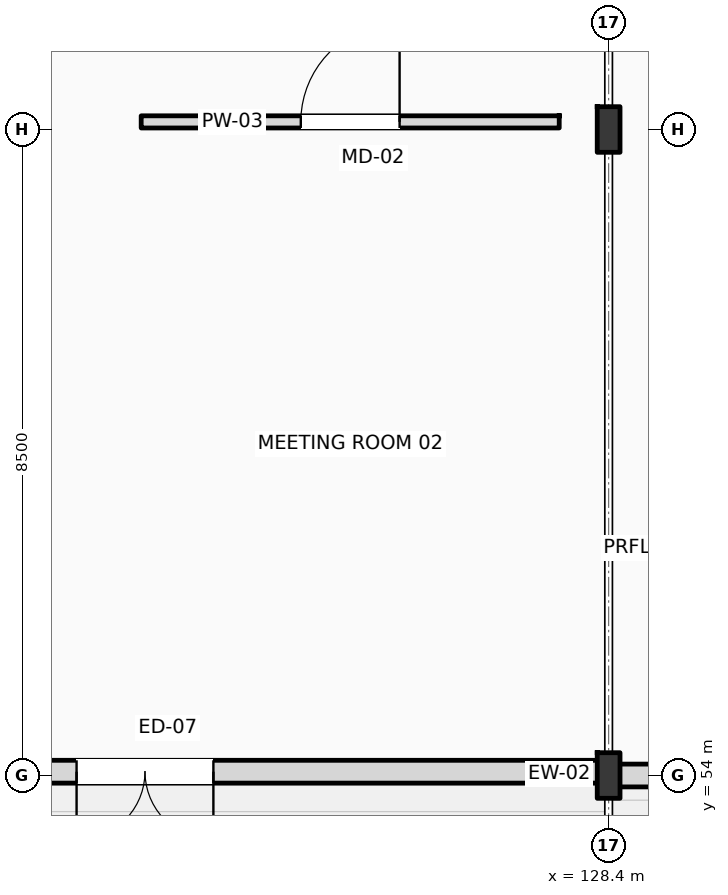
"""IFC4 building model, lengths in metres.
Left out: names, types, materials, properties, quantities, classifications, styles, units other than length and angle.
Written with IfcOpenShell. Run it as: python <this file> out.ifc"""

import sys

from ifc_helpers import new_model, si_unit, direction, frame, frame_2d, origin, origin_2d, place, context, subcontext, project, spatial, rectangle, i_section, extrude, element, fill, save


model = new_model("IFC4")
c1 = context("Model", 3, precision=1e-05, world=origin(), true_north=direction((0.0, 1.0)))
c2 = subcontext(c1, "Body", "Model", "MODEL_VIEW")
j1 = project(units=[si_unit("LENGTHUNIT", "METRE"), si_unit("PLANEANGLEUNIT", "RADIAN")], contexts=[c1])
p1 = place(None, origin())
s1 = spatial("IfcSite", under=j1, at=p1, CompositionType="ELEMENT")
p2 = place(p1, origin())
s2 = spatial("IfcBuilding", under=s1, at=p2, CompositionType="ELEMENT")
p3 = place(p2, origin())
s3 = spatial("IfcBuildingStorey", under=s2, at=p3, CompositionType="ELEMENT", Elevation=0.0)
for number, where, z_axis, x_axis in (
    (1, (128.4, 54.0, 0.0), (0.0, 0.0, 1.0), (1.0, 0.0, 0.0)),
    (2, (128.4, 62.5, 0.0), (0.0, 0.0, 1.0), (1.0, 0.0, 0.0)),
):
    element("IfcColumn", number, at=place(p3, frame(where, z_axis=z_axis, x_axis=x_axis)), inside=s3, PredefinedType="COLUMN", context=c2, shape_type="SweptSolid", body=[
        extrude(i_section(OverallWidth=0.3, OverallDepth=0.6, WebThickness=0.015, FlangeThickness=0.03, FilletRadius=0.027, at=origin_2d()), origin(), (0.0, 0.0, 1.0), 6.0),
    ])
p4 = place(p3, frame((128.4, 54.0, 0.0), z_axis=(0.0, 0.0, 1.0), x_axis=(1.0, 0.0, 0.0)))
e3 = element("IfcWall", 3, at=p4, inside=s3, PredefinedType="STANDARD", context=c2, shape_type="SweptSolid", body=[
    extrude(rectangle(XDim=9.0, YDim=0.3, at=frame_2d((4.5, 0.0))), origin(), (0.0, 0.0, 1.0), 5.09),
])
p5 = place(p4, frame((3.3, 0.0, 0.0)))
e4 = element("IfcOpeningElement", 4, at=p5, cuts=e3, PredefinedType="OPENING", context=c2, shape_type="SweptSolid", body=[
    extrude(rectangle(XDim=2.4, YDim=2.6, at=frame_2d((1.2, 1.3))), frame((0.0, 0.16, 0.0), z_axis=(0.0, -1.0, 0.0), x_axis=(1.0, 0.0, 0.0)), (0.0, 0.0, 1.0), 0.32),
])
p6 = place(p3, frame((103.2, 54.05, 0.0), z_axis=(0.0, 0.0, 1.0), x_axis=(1.0, 0.0, 0.0)))
e5 = element("IfcWall", 5, at=p6, inside=s3, PredefinedType="STANDARD", context=c2, shape_type="SweptSolid", body=[
    extrude(rectangle(XDim=25.15, YDim=0.3, at=frame_2d((12.575, 0.0))), origin(), (0.0, 0.0, 1.0), 5.14),
])
p7 = place(p6, frame((5.95, 0.0, 0.0)))
e6 = element("IfcOpeningElement", 6, at=p7, cuts=e5, PredefinedType="OPENING", context=c2, shape_type="SweptSolid", body=[
    extrude(rectangle(XDim=1.0, YDim=2.15, at=frame_2d((0.5, 1.075))), frame((0.0, 0.16, 0.0), z_axis=(0.0, -1.0, 0.0), x_axis=(1.0, 0.0, 0.0)), (0.0, 0.0, 1.0), 0.32),
])
p8 = place(p6, frame((18.2, 0.0, 0.0)))
e7 = element("IfcOpeningElement", 7, at=p8, cuts=e5, PredefinedType="OPENING", context=c2, shape_type="SweptSolid", body=[
    extrude(rectangle(XDim=1.8, YDim=2.4, at=frame_2d((0.9, 1.2))), frame((0.0, 0.16, 0.0), z_axis=(0.0, -1.0, 0.0), x_axis=(1.0, 0.0, 0.0)), (0.0, 0.0, 1.0), 0.32),
])
p9 = place(p3, frame((122.25, 62.6, 0.0), z_axis=(0.0, 0.0, 1.0), x_axis=(1.0, 0.0, 0.0)))
e8 = element("IfcWall", 8, at=p9, inside=s3, PredefinedType="PARTITIONING", context=c2, shape_type="SweptSolid", body=[
    extrude(rectangle(XDim=5.5, YDim=0.16, at=frame_2d((2.75, 0.0))), origin(), (0.0, 0.0, 1.0), 5.14),
])
p10 = place(p9, frame((2.1, 0.0, 0.0)))
e9 = element("IfcOpeningElement", 9, at=p10, cuts=e8, PredefinedType="OPENING", context=c2, shape_type="SweptSolid", body=[
    extrude(rectangle(XDim=1.3, YDim=2.2, at=frame_2d((0.65, 1.1))), frame((0.0, 0.09, 0.0), z_axis=(0.0, -1.0, 0.0), x_axis=(1.0, 0.0, 0.0)), (0.0, 0.0, 1.0), 0.18),
])
p11 = place(p8, frame((1.8, 0.0, 0.0), z_axis=(0.0, 0.0, 1.0), x_axis=(-1.0, 0.0, 0.0)))
e10 = element("IfcDoor", 10, at=p11, inside=s3, OperationType="DOUBLE_SWING_LEFT", PredefinedType="DOOR", context=c2, shape_type="SweptSolid", body=[
    extrude(rectangle(XDim=1.8, YDim=2.4, at=frame_2d((0.9, 1.2))), frame((0.0, 0.025, 0.0), z_axis=(0.0, -1.0, 0.0), x_axis=(1.0, 0.0, 0.0)), (0.0, 0.0, 1.0), 0.05),
])
fill(e7, e10)
p12 = place(p10, origin())
e11 = element("IfcDoor", 11, at=p12, inside=s3, OperationType="SINGLE_SWING_RIGHT", PredefinedType="DOOR", context=c2, shape_type="SweptSolid", body=[
    extrude(rectangle(XDim=1.3, YDim=2.2, at=frame_2d((0.65, 1.1))), frame((0.0, 0.025, 0.0), z_axis=(0.0, -1.0, 0.0), x_axis=(1.0, 0.0, 0.0)), (0.0, 0.0, 1.0), 0.05),
])
fill(e9, e11)
save(model, sys.argv[1])
